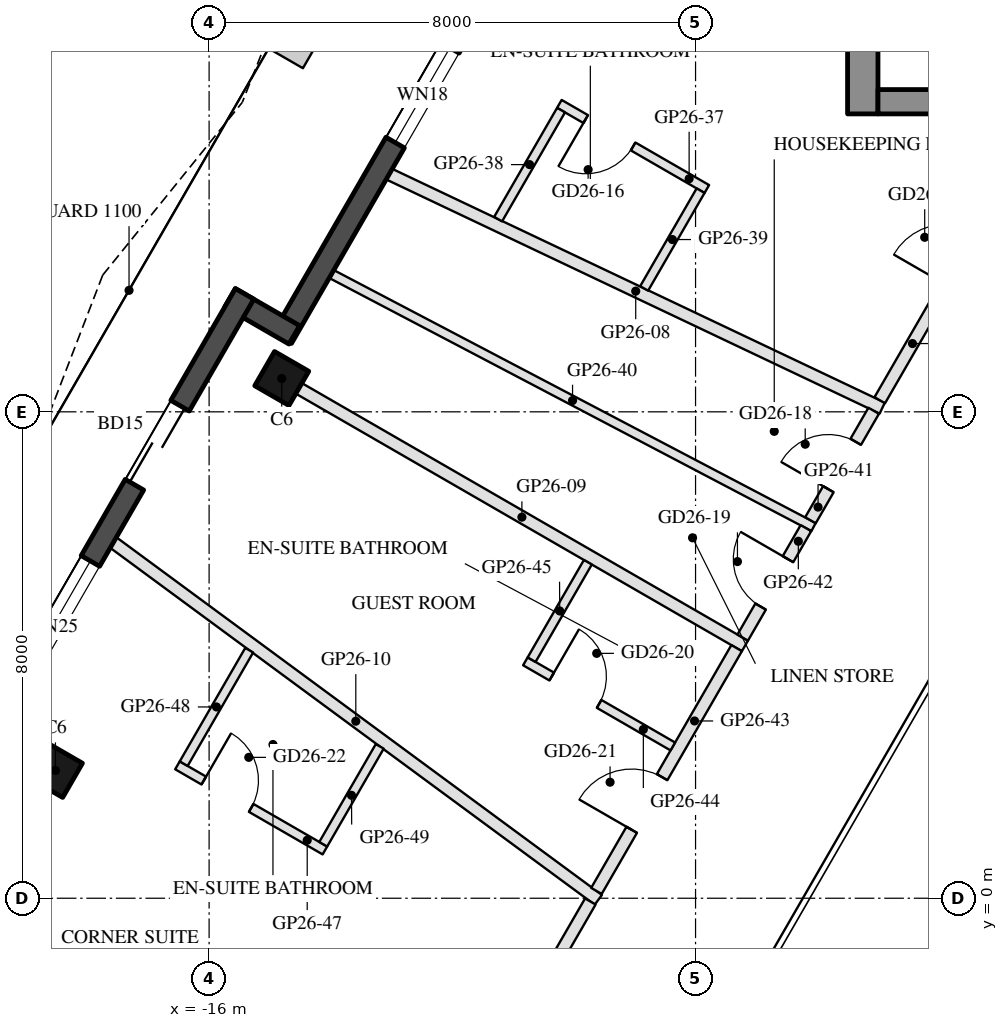
"""IFC4 building model, lengths in metres.
Left out: names, types, materials, properties, quantities, classifications, styles, units other than length and angle.
Written with IfcOpenShell. Run it as: python <this file> out.ifc"""

import sys

from ifc_helpers import new_model, si_unit, direction, frame, frame_2d, origin, origin_2d, place, context, subcontext, project, spatial, rectangle, hollow_rectangle, extrude, boolean, halfspace, element, fill, save


model = new_model("IFC4")
c1 = context("Model", 3, precision=1e-05, world=origin(), true_north=direction((0.0, 1.0)))
c2 = subcontext(c1, "Body", "Model", "MODEL_VIEW")
j1 = project(units=[si_unit("LENGTHUNIT", "METRE"), si_unit("PLANEANGLEUNIT", "RADIAN")], contexts=[c1])
p1 = place(None, origin())
s1 = spatial("IfcSite", under=j1, at=p1, CompositionType="ELEMENT")
p2 = place(p1, origin())
s2 = spatial("IfcBuilding", under=s1, at=p2, CompositionType="ELEMENT")
p3 = place(p2, frame((0.0, 0.0, 268.9)))
s3 = spatial("IfcBuildingStorey", under=s2, at=p3, CompositionType="ELEMENT", Elevation=268.9)
p4 = place(p3, frame((-14.805, 8.548, 0.0), z_axis=(0.0, 0.0, 1.0), x_axis=(0.5, 0.866025403784, 0.0)))
e1 = element("IfcColumn", 1, at=p4, inside=s3, PredefinedType="COLUMN", context=c2, shape_type="SweptSolid", body=[
    boolean("DIFFERENCE", extrude(hollow_rectangle(XDim=0.65, YDim=0.65, WallThickness=0.03, at=origin_2d()), origin(), (0.0, 0.0, 1.0), 3.7), halfspace(frame((0.0, 0.0, 0.037), z_axis=(0.0, 0.0, 1.0), x_axis=(1.0, 0.0, 0.0)), True)),
])
p5 = place(p3, frame((-18.527, 2.102, 0.0), z_axis=(0.0, 0.0, 1.0), x_axis=(0.5, 0.866025403784, 0.0)))
e2 = element("IfcColumn", 2, at=p5, inside=s3, PredefinedType="COLUMN", context=c2, shape_type="SweptSolid", body=[
    boolean("DIFFERENCE", extrude(hollow_rectangle(XDim=0.65, YDim=0.65, WallThickness=0.03, at=origin_2d()), origin(), (0.0, 0.0, 1.0), 3.7), halfspace(frame((0.0, 0.0, 0.04), z_axis=(0.0, 0.0, 1.0), x_axis=(1.0, 0.0, 0.0)), True)),
])
p6 = place(p3, frame((-11.655, 14.655, 0.0), z_axis=(0.0, 0.0, 1.0), x_axis=(-0.499995993298, -0.866027717042, 0.0)))
e3 = element("IfcWall", 3, at=p6, inside=s3, PredefinedType="SOLIDWALL", context=c2, shape_type="SweptSolid", body=[
    extrude(rectangle(XDim=6.284, YDim=0.35, at=frame_2d((3.142, 0.0))), origin(), (0.0, 0.0, 1.0), 3.55),
])
p7 = place(p6, frame((0.77, 0.0, 0.3)))
e4 = element("IfcOpeningElement", 4, at=p7, cuts=e3, PredefinedType="OPENING", context=c2, shape_type="SweptSolid", body=[
    extrude(rectangle(XDim=1.8, YDim=2.65, at=frame_2d((0.9, 1.325))), frame((0.0, 0.185, 0.0), z_axis=(0.0, -1.0, 0.0), x_axis=(1.0, 0.0, 0.0)), (0.0, 0.0, 1.0), 0.37),
])
p8 = place(p3, frame((-14.599, 9.266, 0.0), z_axis=(0.0, 0.0, 1.0), x_axis=(-0.866005645448, 0.500034220881, 0.0)))
e5 = element("IfcWall", 5, at=p8, inside=s3, PredefinedType="SOLIDWALL", context=c2, shape_type="SweptSolid", body=[
    extrude(rectangle(XDim=1.22, YDim=0.35, at=frame_2d((0.61, 0.0))), origin(), (0.0, 0.0, 1.0), 3.55),
])
p9 = place(p3, frame((-15.416, 9.94, 0.0), z_axis=(0.0, 0.0, 1.0), x_axis=(-0.500005190411, -0.866022407078, 0.0)))
e6 = element("IfcWall", 6, at=p9, inside=s3, PredefinedType="SOLIDWALL", context=c2, shape_type="SweptSolid", body=[
    extrude(rectangle(XDim=9.244, YDim=0.35, at=frame_2d((4.622, 0.0))), origin(), (0.0, 0.0, 1.0), 3.55),
])
p10 = place(p9, frame((2.124, 0.0, 0.0)))
e7 = element("IfcOpeningElement", 7, at=p10, cuts=e6, PredefinedType="OPENING", context=c2, shape_type="SweptSolid", body=[
    extrude(rectangle(XDim=1.5, YDim=2.4, at=frame_2d((0.75, 1.2))), frame((0.0, 0.185, 0.0), z_axis=(0.0, -1.0, 0.0), x_axis=(1.0, 0.0, 0.0)), (0.0, 0.0, 1.0), 0.37),
])
p11 = place(p9, frame((5.072, 0.0, 0.3)))
e8 = element("IfcOpeningElement", 8, at=p11, cuts=e6, PredefinedType="OPENING", context=c2, shape_type="SweptSolid", body=[
    extrude(rectangle(XDim=2.5, YDim=2.65, at=frame_2d((1.25, 1.325))), frame((0.0, 0.185, 0.0), z_axis=(0.0, -1.0, 0.0), x_axis=(1.0, 0.0, 0.0)), (0.0, 0.0, 1.0), 0.37),
])
p12 = place(p3, frame((-5.25, 12.9, 0.0), z_axis=(0.0, 0.0, 1.0), x_axis=(0.0, 1.0, 0.0)))
e9 = element("IfcWall", 9, at=p12, inside=s3, PredefinedType="SHEAR", context=c2, shape_type="SweptSolid", body=[
    extrude(rectangle(XDim=13.031, YDim=0.5, at=frame_2d((6.516, 0.0))), origin(), (0.0, 0.0, 1.0), 3.5),
])
p13 = place(p3, frame((5.0, 13.1, 0.0), z_axis=(0.0, 0.0, 1.0), x_axis=(-1.0, 0.0, 0.0)))
e10 = element("IfcWall", 10, at=p13, inside=s3, PredefinedType="SHEAR", context=c2, shape_type="SweptSolid", body=[
    extrude(rectangle(XDim=10.0, YDim=0.4, at=frame_2d((5.0, 0.0))), origin(), (0.0, 0.0, 1.0), 3.5),
])
p14 = place(p13, frame((3.55, 0.0, 0.0)))
e11 = element("IfcOpeningElement", 11, at=p14, cuts=e10, PredefinedType="OPENING", context=c2, shape_type="SweptSolid", body=[
    extrude(rectangle(XDim=1.1, YDim=2.1, at=frame_2d((0.55, 1.05))), frame((0.0, 0.21, 0.0), z_axis=(0.0, -1.0, 0.0), x_axis=(1.0, 0.0, 0.0)), (0.0, 0.0, 1.0), 0.42),
])
p15 = place(p13, frame((5.85, 0.0, 0.0)))
e12 = element("IfcOpeningElement", 12, at=p15, cuts=e10, PredefinedType="OPENING", context=c2, shape_type="SweptSolid", body=[
    extrude(rectangle(XDim=1.4, YDim=2.1, at=frame_2d((0.7, 1.05))), frame((0.0, 0.21, 0.0), z_axis=(0.0, -1.0, 0.0), x_axis=(1.0, 0.0, 0.0)), (0.0, 0.0, 1.0), 0.42),
])
p16 = place(p3, frame((-13.038, 11.909, 0.0), z_axis=(0.0, 0.0, 1.0), x_axis=(0.903427417518, -0.428741065536, 0.0)))
e13 = element("IfcWall", 13, at=p16, inside=s3, PredefinedType="PARTITIONING", context=c2, shape_type="SweptSolid", body=[
    extrude(rectangle(XDim=8.975, YDim=0.2, at=frame_2d((4.487, 0.0))), origin(), (0.0, 0.0, 1.0), 3.0),
])
p17 = place(p3, frame((-14.524, 8.385, 0.0), z_axis=(0.0, 0.0, 1.0), x_axis=(0.866015680395, -0.500016841027, 0.0)))
e14 = element("IfcWall", 14, at=p17, inside=s3, PredefinedType="PARTITIONING", context=c2, shape_type="SweptSolid", body=[
    extrude(rectangle(XDim=8.471, YDim=0.2, at=frame_2d((4.235, 0.0))), origin(), (0.0, 0.0, 1.0), 3.0),
])
p18 = place(p3, frame((-17.576, 5.85, 0.0), z_axis=(0.0, 0.0, 1.0), x_axis=(0.805127680306, -0.593101524535, 0.0)))
e15 = element("IfcWall", 15, at=p18, inside=s3, PredefinedType="PARTITIONING", context=c2, shape_type="SweptSolid", body=[
    extrude(rectangle(XDim=9.907, YDim=0.2, at=frame_2d((4.954, 0.0))), origin(), (0.0, 0.0, 1.0), 3.0),
])
p19 = place(p3, frame((-4.97, 8.191, 0.0), z_axis=(0.0, 0.0, 1.0), x_axis=(0.499994808408, 0.866028401131, 0.0)))
e16 = element("IfcWall", 16, at=p19, inside=s3, PredefinedType="PARTITIONING", context=c2, shape_type="SweptSolid", body=[
    extrude(rectangle(XDim=5.38, YDim=0.2, at=frame_2d((2.69, 0.0))), origin(), (0.0, 0.0, 1.0), 3.0),
])
p20 = place(p19, frame((2.19, 0.0, 0.0)))
e17 = element("IfcOpeningElement", 17, at=p20, cuts=e16, PredefinedType="OPENING", context=c2, shape_type="SweptSolid", body=[
    extrude(rectangle(XDim=1.0, YDim=2.1, at=frame_2d((0.5, 1.05))), frame((0.0, 0.11, 0.0), z_axis=(0.0, -1.0, 0.0), x_axis=(1.0, 0.0, 0.0)), (0.0, 0.0, 1.0), 0.22),
])
p21 = place(p3, frame((-7.815, 11.665, 0.0), z_axis=(0.0, 0.0, 1.0), x_axis=(-0.865996816683, 0.500049511043, 0.0)))
e18 = element("IfcWall", 18, at=p21, inside=s3, PredefinedType="PARTITIONING", context=c2, shape_type="SweptSolid", body=[
    extrude(rectangle(XDim=2.8, YDim=0.15, at=frame_2d((1.4, 0.0))), origin(), (0.0, 0.0, 1.0), 3.55),
])
p22 = place(p21, frame((1.4, 0.0, 0.0)))
e19 = element("IfcOpeningElement", 19, at=p22, cuts=e18, PredefinedType="OPENING", context=c2, shape_type="SweptSolid", body=[
    extrude(rectangle(XDim=0.9, YDim=2.1, at=frame_2d((0.45, 1.05))), frame((0.0, 0.085, 0.0), z_axis=(0.0, -1.0, 0.0), x_axis=(1.0, 0.0, 0.0)), (0.0, 0.0, 1.0), 0.17),
])
p23 = place(p3, frame((-10.212, 12.962, 0.0), z_axis=(0.0, 0.0, 1.0), x_axis=(-0.500008344384, -0.866020586098, 0.0)))
e20 = element("IfcWall", 20, at=p23, inside=s3, PredefinedType="PARTITIONING", context=c2, shape_type="SweptSolid", body=[
    extrude(rectangle(XDim=2.07, YDim=0.15, at=frame_2d((1.035, 0.0))), origin(), (0.0, 0.0, 1.0), 3.55),
])
p24 = place(p3, frame((-7.917, 11.637, 0.0), z_axis=(0.0, 0.0, 1.0), x_axis=(-0.500071598593, -0.865984062371, 0.0)))
e21 = element("IfcWall", 21, at=p24, inside=s3, PredefinedType="PARTITIONING", context=c2, shape_type="SweptSolid", body=[
    extrude(rectangle(XDim=1.856, YDim=0.15, at=frame_2d((0.928, 0.0))), origin(), (0.0, 0.0, 1.0), 3.55),
])
p25 = place(p3, frame((-13.987, 10.266, 0.0), z_axis=(0.0, 0.0, 1.0), x_axis=(0.885474206285, -0.464688530097, 0.0)))
e22 = element("IfcWall", 22, at=p25, inside=s3, PredefinedType="PARTITIONING", context=c2, shape_type="SweptSolid", body=[
    extrude(rectangle(XDim=8.953, YDim=0.15, at=frame_2d((4.477, 0.0))), origin(), (0.0, 0.0, 1.0), 3.16),
])
p26 = place(p3, frame((-6.11, 6.217, 0.0), z_axis=(0.0, 0.0, 1.0), x_axis=(0.500017307165, 0.866015411258, 0.0)))
e23 = element("IfcWall", 23, at=p26, inside=s3, PredefinedType="PARTITIONING", context=c2, shape_type="SweptSolid", body=[
    extrude(rectangle(XDim=2.079, YDim=0.2, at=frame_2d((1.039, 0.0))), origin(), (0.0, 0.0, 1.0), 3.0),
])
p27 = place(p26, frame((0.589, 0.0, 0.0)))
e24 = element("IfcOpeningElement", 24, at=p27, cuts=e23, PredefinedType="OPENING", context=c2, shape_type="SweptSolid", body=[
    extrude(rectangle(XDim=0.9, YDim=2.1, at=frame_2d((0.45, 1.05))), frame((0.0, 0.11, 0.0), z_axis=(0.0, -1.0, 0.0), x_axis=(1.0, 0.0, 0.0)), (0.0, 0.0, 1.0), 0.22),
])
p28 = place(p3, frame((-7.225, 4.287, 0.0), z_axis=(0.0, 0.0, 1.0), x_axis=(0.500003678222, 0.866023280152, 0.0)))
e25 = element("IfcWall", 25, at=p28, inside=s3, PredefinedType="PARTITIONING", context=c2, shape_type="SweptSolid", body=[
    extrude(rectangle(XDim=2.079, YDim=0.2, at=frame_2d((1.04, 0.0))), origin(), (0.0, 0.0, 1.0), 3.0),
])
p29 = place(p28, frame((0.59, 0.0, 0.0)))
e26 = element("IfcOpeningElement", 26, at=p29, cuts=e25, PredefinedType="OPENING", context=c2, shape_type="SweptSolid", body=[
    extrude(rectangle(XDim=0.9, YDim=2.1, at=frame_2d((0.45, 1.05))), frame((0.0, 0.11, 0.0), z_axis=(0.0, -1.0, 0.0), x_axis=(1.0, 0.0, 0.0)), (0.0, 0.0, 1.0), 0.22),
])
p30 = place(p3, frame((-9.63, 0.121, 0.0), z_axis=(0.0, 0.0, 1.0), x_axis=(0.500000544019, 0.866025089694, 0.0)))
e27 = element("IfcWall", 27, at=p30, inside=s3, PredefinedType="PARTITIONING", context=c2, shape_type="SweptSolid", body=[
    extrude(rectangle(XDim=4.61, YDim=0.2, at=frame_2d((2.305, 0.0))), origin(), (0.0, 0.0, 1.0), 3.0),
])
p31 = place(p30, frame((1.161, 0.0, 0.0)))
e28 = element("IfcOpeningElement", 28, at=p31, cuts=e27, PredefinedType="OPENING", context=c2, shape_type="SweptSolid", body=[
    extrude(rectangle(XDim=1.0, YDim=2.1, at=frame_2d((0.5, 1.05))), frame((0.0, 0.11, 0.0), z_axis=(0.0, -1.0, 0.0), x_axis=(1.0, 0.0, 0.0)), (0.0, 0.0, 1.0), 0.22),
])
p32 = place(p3, frame((-10.799, 3.896, 0.0), z_axis=(0.0, 0.0, 1.0), x_axis=(0.866034573852, -0.49998411664, 0.0)))
e29 = element("IfcWall", 29, at=p32, inside=s3, PredefinedType="PARTITIONING", context=c2, shape_type="SweptSolid", body=[
    extrude(rectangle(XDim=2.8, YDim=0.15, at=frame_2d((1.4, 0.0))), origin(), (0.0, 0.0, 1.0), 3.55),
])
p33 = place(p32, frame((0.5, 0.0, 0.0)))
e30 = element("IfcOpeningElement", 30, at=p33, cuts=e29, PredefinedType="OPENING", context=c2, shape_type="SweptSolid", body=[
    extrude(rectangle(XDim=0.9, YDim=2.1, at=frame_2d((0.45, 1.05))), frame((0.0, 0.085, 0.0), z_axis=(0.0, -1.0, 0.0), x_axis=(1.0, 0.0, 0.0)), (0.0, 0.0, 1.0), 0.17),
])
p34 = place(p3, frame((-9.771, 5.526, 0.0), z_axis=(0.0, 0.0, 1.0), x_axis=(-0.500042316284, -0.866000971088, 0.0)))
e31 = element("IfcWall", 31, at=p34, inside=s3, PredefinedType="PARTITIONING", context=c2, shape_type="SweptSolid", body=[
    extrude(rectangle(XDim=1.85, YDim=0.15, at=frame_2d((0.925, 0.0))), origin(), (0.0, 0.0, 1.0), 3.0),
])
p35 = place(p3, frame((-12.269, -4.45, 0.0), z_axis=(0.0, 0.0, 1.0), x_axis=(0.500023578739, 0.866011790165, 0.0)))
e32 = element("IfcWall", 32, at=p35, inside=s3, PredefinedType="PARTITIONING", context=c2, shape_type="SweptSolid", body=[
    extrude(rectangle(XDim=5.076, YDim=0.2, at=frame_2d((2.538, 0.0))), origin(), (0.0, 0.0, 1.0), 3.0),
])
p36 = place(p35, frame((2.038, 0.0, 0.0)))
e33 = element("IfcOpeningElement", 33, at=p36, cuts=e32, PredefinedType="OPENING", context=c2, shape_type="SweptSolid", body=[
    extrude(rectangle(XDim=1.0, YDim=2.1, at=frame_2d((0.5, 1.05))), frame((0.0, 0.11, 0.0), z_axis=(0.0, -1.0, 0.0), x_axis=(1.0, 0.0, 0.0)), (0.0, 0.0, 1.0), 0.22),
])
p37 = place(p3, frame((-16.521, 2.186, 0.0), z_axis=(0.0, 0.0, 1.0), x_axis=(0.865996816683, -0.500049511043, 0.0)))
e34 = element("IfcWall", 34, at=p37, inside=s3, PredefinedType="PARTITIONING", context=c2, shape_type="SweptSolid", body=[
    extrude(rectangle(XDim=2.8, YDim=0.15, at=frame_2d((1.4, 0.0))), origin(), (0.0, 0.0, 1.0), 3.55),
])
p38 = place(p37, frame((0.5, 0.0, 0.0)))
e35 = element("IfcOpeningElement", 35, at=p38, cuts=e34, PredefinedType="OPENING", context=c2, shape_type="SweptSolid", body=[
    extrude(rectangle(XDim=0.9, YDim=2.1, at=frame_2d((0.45, 1.05))), frame((0.0, 0.085, 0.0), z_axis=(0.0, -1.0, 0.0), x_axis=(1.0, 0.0, 0.0)), (0.0, 0.0, 1.0), 0.17),
])
p39 = place(p3, frame((-15.341, 4.079, 0.0), z_axis=(0.0, 0.0, 1.0), x_axis=(-0.499941519689, -0.866059164775, 0.0)))
e36 = element("IfcWall", 36, at=p39, inside=s3, PredefinedType="PARTITIONING", context=c2, shape_type="SweptSolid", body=[
    extrude(rectangle(XDim=2.155, YDim=0.15, at=frame_2d((1.077, 0.0))), origin(), (0.0, 0.0, 1.0), 3.55),
])
p40 = place(p3, frame((-13.194, 2.498, 0.0), z_axis=(0.0, 0.0, 1.0), x_axis=(-0.500010545262, -0.866019315389, 0.0)))
e37 = element("IfcWall", 37, at=p40, inside=s3, PredefinedType="PARTITIONING", context=c2, shape_type="SweptSolid", body=[
    extrude(rectangle(XDim=1.858, YDim=0.15, at=frame_2d((0.929, 0.0))), origin(), (0.0, 0.0, 1.0), 3.55),
])
p41 = place(p7, origin())
e38 = element("IfcWindow", 38, at=p41, inside=s3, PartitioningType="SINGLE_PANEL", PredefinedType="WINDOW", context=c2, shape_type="SweptSolid", body=[
    extrude(rectangle(XDim=1.8, YDim=2.65, at=frame_2d((0.9, 1.325))), frame((0.0, 0.03, 0.0), z_axis=(0.0, -1.0, 0.0), x_axis=(1.0, 0.0, 0.0)), (0.0, 0.0, 1.0), 0.06),
])
fill(e4, e38)
p42 = place(p10, frame((1.5, 0.0, 0.0), z_axis=(0.0, 0.0, 1.0), x_axis=(-1.0, 0.0, 0.0)))
e39 = element("IfcDoor", 39, at=p42, inside=s3, OperationType="SLIDING_TO_LEFT", PredefinedType="DOOR", context=c2, shape_type="SweptSolid", body=[
    extrude(rectangle(XDim=1.5, YDim=2.4, at=frame_2d((0.75, 1.2))), frame((0.0, 0.025, 0.0), z_axis=(0.0, -1.0, 0.0), x_axis=(1.0, 0.0, 0.0)), (0.0, 0.0, 1.0), 0.05),
])
fill(e7, e39)
p43 = place(p11, origin())
e40 = element("IfcWindow", 40, at=p43, inside=s3, PartitioningType="SINGLE_PANEL", PredefinedType="WINDOW", context=c2, shape_type="SweptSolid", body=[
    extrude(rectangle(XDim=2.5, YDim=2.65, at=frame_2d((1.25, 1.325))), frame((0.0, 0.03, 0.0), z_axis=(0.0, -1.0, 0.0), x_axis=(1.0, 0.0, 0.0)), (0.0, 0.0, 1.0), 0.06),
])
fill(e8, e40)
p44 = place(p22, origin())
e41 = element("IfcDoor", 41, at=p44, inside=s3, OperationType="SINGLE_SWING_RIGHT", PredefinedType="DOOR", context=c2, shape_type="SweptSolid", body=[
    extrude(rectangle(XDim=0.9, YDim=2.1, at=frame_2d((0.45, 1.05))), frame((0.0, 0.025, 0.0), z_axis=(0.0, -1.0, 0.0), x_axis=(1.0, 0.0, 0.0)), (0.0, 0.0, 1.0), 0.05),
])
fill(e19, e41)
p45 = place(p27, origin())
e42 = element("IfcDoor", 42, at=p45, inside=s3, OperationType="SINGLE_SWING_LEFT", PredefinedType="DOOR", context=c2, shape_type="SweptSolid", body=[
    extrude(rectangle(XDim=0.9, YDim=2.1, at=frame_2d((0.45, 1.05))), frame((0.0, 0.025, 0.0), z_axis=(0.0, -1.0, 0.0), x_axis=(1.0, 0.0, 0.0)), (0.0, 0.0, 1.0), 0.05),
])
fill(e24, e42)
p46 = place(p29, origin())
e43 = element("IfcDoor", 43, at=p46, inside=s3, OperationType="SINGLE_SWING_RIGHT", PredefinedType="DOOR", context=c2, shape_type="SweptSolid", body=[
    extrude(rectangle(XDim=0.9, YDim=2.1, at=frame_2d((0.45, 1.05))), frame((0.0, 0.025, 0.0), z_axis=(0.0, -1.0, 0.0), x_axis=(1.0, 0.0, 0.0)), (0.0, 0.0, 1.0), 0.05),
])
fill(e26, e43)
p47 = place(p33, origin())
e44 = element("IfcDoor", 44, at=p47, inside=s3, OperationType="SINGLE_SWING_LEFT", PredefinedType="DOOR", context=c2, shape_type="SweptSolid", body=[
    extrude(rectangle(XDim=0.9, YDim=2.1, at=frame_2d((0.45, 1.05))), frame((0.0, 0.025, 0.0), z_axis=(0.0, -1.0, 0.0), x_axis=(1.0, 0.0, 0.0)), (0.0, 0.0, 1.0), 0.05),
])
fill(e30, e44)
p48 = place(p31, origin())
e45 = element("IfcDoor", 45, at=p48, inside=s3, OperationType="SINGLE_SWING_LEFT", PredefinedType="DOOR", context=c2, shape_type="SweptSolid", body=[
    extrude(rectangle(XDim=1.0, YDim=2.1, at=frame_2d((0.5, 1.05))), frame((0.0, 0.025, 0.0), z_axis=(0.0, -1.0, 0.0), x_axis=(1.0, 0.0, 0.0)), (0.0, 0.0, 1.0), 0.05),
])
fill(e28, e45)
p49 = place(p38, origin())
e46 = element("IfcDoor", 46, at=p49, inside=s3, OperationType="SINGLE_SWING_LEFT", PredefinedType="DOOR", context=c2, shape_type="SweptSolid", body=[
    extrude(rectangle(XDim=0.9, YDim=2.1, at=frame_2d((0.45, 1.05))), frame((0.0, 0.025, 0.0), z_axis=(0.0, -1.0, 0.0), x_axis=(1.0, 0.0, 0.0)), (0.0, 0.0, 1.0), 0.05),
])
fill(e35, e46)
save(model, sys.argv[1])
